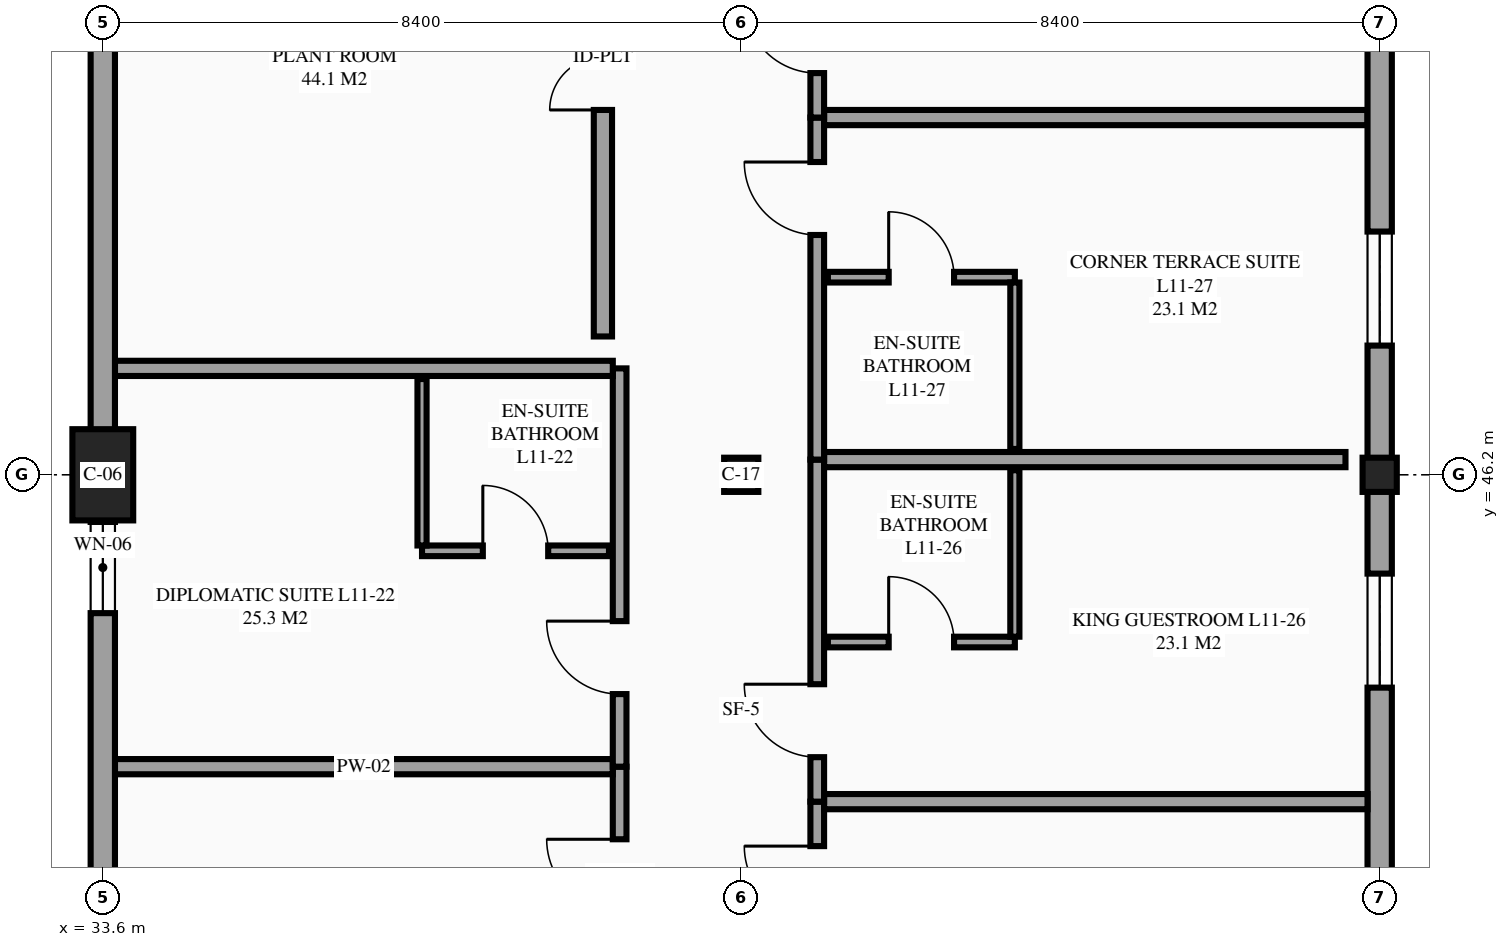
"""IFC4 building model, lengths in metres.
Left out: names, types, materials, properties, quantities, classifications, styles, units other than length and angle.
Written with IfcOpenShell. Run it as: python <this file> out.ifc"""

import sys

from ifc_helpers import new_model, si_unit, direction, frame, frame_2d, origin, origin_2d, place, context, subcontext, project, spatial, rectangle, extrude, element, fill, save


model = new_model("IFC4")
c1 = context("Model", 3, precision=1e-05, world=origin(), true_north=direction((0.0, 1.0)))
c2 = subcontext(c1, "Body", "Model", "MODEL_VIEW")
j1 = project(units=[si_unit("LENGTHUNIT", "METRE"), si_unit("PLANEANGLEUNIT", "RADIAN")], contexts=[c1])
p1 = place(None, origin())
s1 = spatial("IfcSite", under=j1, at=p1, CompositionType="ELEMENT")
p2 = place(p1, origin())
s2 = spatial("IfcBuilding", under=s1, at=p2, CompositionType="ELEMENT")
p3 = place(p2, frame((0.0, 0.0, 43.5)))
s3 = spatial("IfcBuildingStorey", under=s2, at=p3, CompositionType="ELEMENT", Elevation=43.5)
p4 = place(p3, frame((33.6, 46.2, 0.0), z_axis=(0.0, 0.0, 1.0), x_axis=(1.0, 0.0, 0.0)))
e1 = element("IfcColumn", 1, at=p4, inside=s3, PredefinedType="COLUMN", context=c2, shape_type="SweptSolid", body=[
    extrude(rectangle(XDim=0.8, YDim=1.2, at=origin_2d()), origin(), (0.0, 0.0, 1.0), 3.6),
])
for number, where, z_axis, x_axis in (
    (2, (42.0, 46.2, 0.0), (0.0, 0.0, 1.0), (1.0, 0.0, 0.0)),
    (3, (50.4, 46.2, 0.0), (0.0, 0.0, 1.0), (1.0, 0.0, 0.0)),
):
    element("IfcColumn", number, at=place(p3, frame(where, z_axis=z_axis, x_axis=x_axis)), inside=s3, PredefinedType="COLUMN", context=c2, shape_type="SweptSolid", body=[
        extrude(rectangle(XDim=0.45, YDim=0.45, at=origin_2d()), origin(), (0.0, 0.0, 1.0), 3.6),
    ])
p5 = place(p3, frame((50.4, 21.0, 0.0), z_axis=(0.0, 0.0, 1.0), x_axis=(0.0, 1.0, 0.0)))
e4 = element("IfcWall", 4, at=p5, inside=s3, PredefinedType="STANDARD", context=c2, shape_type="SweptSolid", body=[
    extrude(rectangle(XDim=25.2, YDim=0.32, at=frame_2d((12.6, 0.0))), origin(), (0.0, 0.0, 1.0), 2.51),
])
p6 = place(p5, frame((2.4, 0.0, 0.85)))
e5 = element("IfcOpeningElement", 5, at=p6, cuts=e4, PredefinedType="OPENING", context=c2, shape_type="SweptSolid", body=[
    extrude(rectangle(XDim=1.5, YDim=1.5, at=frame_2d((0.75, 0.75))), frame((0.0, 0.17, 0.0), z_axis=(0.0, -1.0, 0.0), x_axis=(1.0, 0.0, 0.0)), (0.0, 0.0, 1.0), 0.34),
])
p7 = place(p5, frame((9.15, 0.0, 0.85)))
e6 = element("IfcOpeningElement", 6, at=p7, cuts=e4, PredefinedType="OPENING", context=c2, shape_type="SweptSolid", body=[
    extrude(rectangle(XDim=1.5, YDim=1.5, at=frame_2d((0.75, 0.75))), frame((0.0, 0.17, 0.0), z_axis=(0.0, -1.0, 0.0), x_axis=(1.0, 0.0, 0.0)), (0.0, 0.0, 1.0), 0.34),
])
p8 = place(p5, frame((17.9, 0.0, 0.85)))
e7 = element("IfcOpeningElement", 7, at=p8, cuts=e4, PredefinedType="OPENING", context=c2, shape_type="SweptSolid", body=[
    extrude(rectangle(XDim=1.5, YDim=1.5, at=frame_2d((0.75, 0.75))), frame((0.0, 0.17, 0.0), z_axis=(0.0, -1.0, 0.0), x_axis=(1.0, 0.0, 0.0)), (0.0, 0.0, 1.0), 0.34),
])
p9 = place(p5, frame((22.4, 0.0, 0.85)))
e8 = element("IfcOpeningElement", 8, at=p9, cuts=e4, PredefinedType="OPENING", context=c2, shape_type="SweptSolid", body=[
    extrude(rectangle(XDim=1.5, YDim=1.5, at=frame_2d((0.75, 0.75))), frame((0.0, 0.17, 0.0), z_axis=(0.0, -1.0, 0.0), x_axis=(1.0, 0.0, 0.0)), (0.0, 0.0, 1.0), 0.34),
])
p10 = place(p3, frame((40.4, 37.12, 0.0), z_axis=(0.0, 0.0, 1.0), x_axis=(0.0, 1.0, 0.0)))
e9 = element("IfcWall", 9, at=p10, inside=s3, PredefinedType="PARTITIONING", context=c2, shape_type="SweptSolid", body=[
    extrude(rectangle(XDim=5.24, YDim=0.18, at=frame_2d((2.62, 0.0))), origin(), (0.0, 0.0, 1.0), 3.355),
])
p11 = place(p10, frame((3.325, 0.0, 0.0)))
e10 = element("IfcOpeningElement", 10, at=p11, cuts=e9, PredefinedType="OPENING", context=c2, shape_type="SweptSolid", body=[
    extrude(rectangle(XDim=0.96, YDim=2.15, at=frame_2d((0.48, 1.075))), frame((0.0, 0.1, 0.0), z_axis=(0.0, -1.0, 0.0), x_axis=(1.0, 0.0, 0.0)), (0.0, 0.0, 1.0), 0.2),
])
p12 = place(p3, frame((33.76, 42.36, 0.0), z_axis=(0.0, 0.0, 1.0), x_axis=(1.0, 0.0, 0.0)))
e11 = element("IfcWall", 11, at=p12, inside=s3, PredefinedType="PARTITIONING", context=c2, shape_type="SweptSolid", body=[
    extrude(rectangle(XDim=6.55, YDim=0.2, at=frame_2d((3.275, 0.0))), origin(), (0.0, 0.0, 1.0), 3.355),
])
p13 = place(p3, frame((40.4, 42.36, 0.0), z_axis=(0.0, 0.0, 1.0), x_axis=(0.0, 1.0, 0.0)))
e12 = element("IfcWall", 12, at=p13, inside=s3, PredefinedType="PARTITIONING", context=c2, shape_type="SweptSolid", body=[
    extrude(rectangle(XDim=5.24, YDim=0.18, at=frame_2d((2.62, 0.0))), origin(), (0.0, 0.0, 1.0), 3.355),
])
p14 = place(p13, frame((0.955, 0.0, 0.0)))
e13 = element("IfcOpeningElement", 13, at=p14, cuts=e12, PredefinedType="OPENING", context=c2, shape_type="SweptSolid", body=[
    extrude(rectangle(XDim=0.96, YDim=2.15, at=frame_2d((0.48, 1.075))), frame((0.0, 0.1, 0.0), z_axis=(0.0, -1.0, 0.0), x_axis=(1.0, 0.0, 0.0)), (0.0, 0.0, 1.0), 0.2),
])
p15 = place(p3, frame((33.76, 47.6, 0.0), z_axis=(0.0, 0.0, 1.0), x_axis=(1.0, 0.0, 0.0)))
e14 = element("IfcWall", 14, at=p15, inside=s3, PredefinedType="PARTITIONING", context=c2, shape_type="SweptSolid", body=[
    extrude(rectangle(XDim=6.55, YDim=0.2, at=frame_2d((3.275, 0.0))), origin(), (0.0, 0.0, 1.0), 3.355),
])
p16 = place(p3, frame((37.8, 45.2, 0.0), z_axis=(0.0, 0.0, 1.0), x_axis=(1.0, 0.0, 0.0)))
e15 = element("IfcWall", 15, at=p16, inside=s3, PredefinedType="PARTITIONING", context=c2, shape_type="SweptSolid", body=[
    extrude(rectangle(XDim=2.46, YDim=0.14, at=frame_2d((1.23, 0.0))), origin(), (0.0, 0.0, 1.0), 3.355),
])
p17 = place(p16, frame((0.8, 0.0, 0.0)))
e16 = element("IfcOpeningElement", 16, at=p17, cuts=e15, PredefinedType="OPENING", context=c2, shape_type="SweptSolid", body=[
    extrude(rectangle(XDim=0.86, YDim=2.1, at=frame_2d((0.43, 1.05))), frame((0.0, 0.08, 0.0), z_axis=(0.0, -1.0, 0.0), x_axis=(1.0, 0.0, 0.0)), (0.0, 0.0, 1.0), 0.16),
])
p18 = place(p3, frame((37.8, 45.27, 0.0), z_axis=(0.0, 0.0, 1.0), x_axis=(0.0, 1.0, 0.0)))
e17 = element("IfcWall", 17, at=p18, inside=s3, PredefinedType="PARTITIONING", context=c2, shape_type="SweptSolid", body=[
    extrude(rectangle(XDim=2.19, YDim=0.12, at=frame_2d((1.095, 0.0))), origin(), (0.0, 0.0, 1.0), 3.355),
])
p19 = place(p3, frame((43.0, 37.4, 0.0), z_axis=(0.0, 0.0, 1.0), x_axis=(0.0, 1.0, 0.0)))
e18 = element("IfcWall", 18, at=p19, inside=s3, PredefinedType="PARTITIONING", context=c2, shape_type="SweptSolid", body=[
    extrude(rectangle(XDim=4.5, YDim=0.18, at=frame_2d((2.25, 0.0))), origin(), (0.0, 0.0, 1.0), 3.355),
])
p20 = place(p19, frame((2.955, 0.0, 0.0)))
e19 = element("IfcOpeningElement", 19, at=p20, cuts=e18, PredefinedType="OPENING", context=c2, shape_type="SweptSolid", body=[
    extrude(rectangle(XDim=0.96, YDim=2.15, at=frame_2d((0.48, 1.075))), frame((0.0, 0.1, 0.0), z_axis=(0.0, -1.0, 0.0), x_axis=(1.0, 0.0, 0.0)), (0.0, 0.0, 1.0), 0.2),
])
p21 = place(p3, frame((43.09, 41.9, 0.0), z_axis=(0.0, 0.0, 1.0), x_axis=(1.0, 0.0, 0.0)))
e20 = element("IfcWall", 20, at=p21, inside=s3, PredefinedType="PARTITIONING", context=c2, shape_type="SweptSolid", body=[
    extrude(rectangle(XDim=7.15, YDim=0.2, at=frame_2d((3.575, 0.0))), origin(), (0.0, 0.0, 1.0), 2.81),
])
p22 = place(p3, frame((43.0, 41.9, 0.0), z_axis=(0.0, 0.0, 1.0), x_axis=(0.0, 1.0, 0.0)))
e21 = element("IfcWall", 21, at=p22, inside=s3, PredefinedType="PARTITIONING", context=c2, shape_type="SweptSolid", body=[
    extrude(rectangle(XDim=4.5, YDim=0.18, at=frame_2d((2.25, 0.0))), origin(), (0.0, 0.0, 1.0), 3.355),
])
p23 = place(p22, frame((0.585, 0.0, 0.0)))
e22 = element("IfcOpeningElement", 22, at=p23, cuts=e21, PredefinedType="OPENING", context=c2, shape_type="SweptSolid", body=[
    extrude(rectangle(XDim=0.96, YDim=2.15, at=frame_2d((0.48, 1.075))), frame((0.0, 0.1, 0.0), z_axis=(0.0, -1.0, 0.0), x_axis=(1.0, 0.0, 0.0)), (0.0, 0.0, 1.0), 0.2),
])
p24 = place(p3, frame((43.09, 46.4, 0.0), z_axis=(0.0, 0.0, 1.0), x_axis=(1.0, 0.0, 0.0)))
e23 = element("IfcWall", 23, at=p24, inside=s3, PredefinedType="PARTITIONING", context=c2, shape_type="SweptSolid", body=[
    extrude(rectangle(XDim=6.86, YDim=0.2, at=frame_2d((3.43, 0.0))), origin(), (0.0, 0.0, 1.0), 2.66),
])
p25 = place(p3, frame((43.14, 44.0, 0.0), z_axis=(0.0, 0.0, 1.0), x_axis=(1.0, 0.0, 0.0)))
e24 = element("IfcWall", 24, at=p25, inside=s3, PredefinedType="PARTITIONING", context=c2, shape_type="SweptSolid", body=[
    extrude(rectangle(XDim=2.46, YDim=0.14, at=frame_2d((1.23, 0.0))), origin(), (0.0, 0.0, 1.0), 3.355),
])
p26 = place(p25, frame((0.8, 0.0, 0.0)))
e25 = element("IfcOpeningElement", 25, at=p26, cuts=e24, PredefinedType="OPENING", context=c2, shape_type="SweptSolid", body=[
    extrude(rectangle(XDim=0.86, YDim=2.1, at=frame_2d((0.43, 1.05))), frame((0.0, 0.08, 0.0), z_axis=(0.0, -1.0, 0.0), x_axis=(1.0, 0.0, 0.0)), (0.0, 0.0, 1.0), 0.16),
])
p27 = place(p3, frame((45.6, 44.07, 0.0), z_axis=(0.0, 0.0, 1.0), x_axis=(0.0, 1.0, 0.0)))
e26 = element("IfcWall", 26, at=p27, inside=s3, PredefinedType="PARTITIONING", context=c2, shape_type="SweptSolid", body=[
    extrude(rectangle(XDim=2.19, YDim=0.12, at=frame_2d((1.095, 0.0))), origin(), (0.0, 0.0, 1.0), 3.355),
])
p28 = place(p3, frame((43.0, 46.4, 0.0), z_axis=(0.0, 0.0, 1.0), x_axis=(0.0, 1.0, 0.0)))
e27 = element("IfcWall", 27, at=p28, inside=s3, PredefinedType="PARTITIONING", context=c2, shape_type="SweptSolid", body=[
    extrude(rectangle(XDim=4.5, YDim=0.18, at=frame_2d((2.25, 0.0))), origin(), (0.0, 0.0, 1.0), 3.355),
])
p29 = place(p28, frame((2.955, 0.0, 0.0)))
e28 = element("IfcOpeningElement", 28, at=p29, cuts=e27, PredefinedType="OPENING", context=c2, shape_type="SweptSolid", body=[
    extrude(rectangle(XDim=0.96, YDim=2.15, at=frame_2d((0.48, 1.075))), frame((0.0, 0.1, 0.0), z_axis=(0.0, -1.0, 0.0), x_axis=(1.0, 0.0, 0.0)), (0.0, 0.0, 1.0), 0.2),
])
p30 = place(p3, frame((43.09, 50.9, 0.0), z_axis=(0.0, 0.0, 1.0), x_axis=(1.0, 0.0, 0.0)))
e29 = element("IfcWall", 29, at=p30, inside=s3, PredefinedType="PARTITIONING", context=c2, shape_type="SweptSolid", body=[
    extrude(rectangle(XDim=7.15, YDim=0.2, at=frame_2d((3.575, 0.0))), origin(), (0.0, 0.0, 1.0), 3.355),
])
p31 = place(p3, frame((43.14, 48.8, 0.0), z_axis=(0.0, 0.0, 1.0), x_axis=(1.0, 0.0, 0.0)))
e30 = element("IfcWall", 30, at=p31, inside=s3, PredefinedType="PARTITIONING", context=c2, shape_type="SweptSolid", body=[
    extrude(rectangle(XDim=2.46, YDim=0.14, at=frame_2d((1.23, 0.0))), origin(), (0.0, 0.0, 1.0), 3.355),
])
p32 = place(p31, frame((0.8, 0.0, 0.0)))
e31 = element("IfcOpeningElement", 31, at=p32, cuts=e30, PredefinedType="OPENING", context=c2, shape_type="SweptSolid", body=[
    extrude(rectangle(XDim=0.86, YDim=2.1, at=frame_2d((0.43, 1.05))), frame((0.0, 0.08, 0.0), z_axis=(0.0, -1.0, 0.0), x_axis=(1.0, 0.0, 0.0)), (0.0, 0.0, 1.0), 0.16),
])
p33 = place(p3, frame((45.6, 46.54, 0.0), z_axis=(0.0, 0.0, 1.0), x_axis=(0.0, 1.0, 0.0)))
e32 = element("IfcWall", 32, at=p33, inside=s3, PredefinedType="PARTITIONING", context=c2, shape_type="SweptSolid", body=[
    extrude(rectangle(XDim=2.19, YDim=0.12, at=frame_2d((1.095, 0.0))), origin(), (0.0, 0.0, 1.0), 3.355),
])
p34 = place(p3, frame((43.0, 50.9, 0.0), z_axis=(0.0, 0.0, 1.0), x_axis=(0.0, 1.0, 0.0)))
e33 = element("IfcWall", 33, at=p34, inside=s3, PredefinedType="PARTITIONING", context=c2, shape_type="SweptSolid", body=[
    extrude(rectangle(XDim=4.5, YDim=0.18, at=frame_2d((2.25, 0.0))), origin(), (0.0, 0.0, 1.0), 3.355),
])
p35 = place(p34, frame((0.585, 0.0, 0.0)))
e34 = element("IfcOpeningElement", 34, at=p35, cuts=e33, PredefinedType="OPENING", context=c2, shape_type="SweptSolid", body=[
    extrude(rectangle(XDim=0.96, YDim=2.15, at=frame_2d((0.48, 1.075))), frame((0.0, 0.1, 0.0), z_axis=(0.0, -1.0, 0.0), x_axis=(1.0, 0.0, 0.0)), (0.0, 0.0, 1.0), 0.2),
])
p36 = place(p3, frame((40.18, 48.02, 0.0), z_axis=(0.0, 0.0, 1.0), x_axis=(0.0, 1.0, 0.0)))
e35 = element("IfcWall", 35, at=p36, inside=s3, PredefinedType="PARTITIONING", context=c2, shape_type="SweptSolid", body=[
    extrude(rectangle(XDim=7.36, YDim=0.24, at=frame_2d((3.68, 0.0))), origin(), (0.0, 0.0, 1.0), 3.355),
])
p37 = place(p36, frame((2.98, 0.0, 0.0)))
e36 = element("IfcOpeningElement", 36, at=p37, cuts=e35, PredefinedType="OPENING", context=c2, shape_type="SweptSolid", body=[
    extrude(rectangle(XDim=1.4, YDim=2.2, at=frame_2d((0.7, 1.1))), frame((0.0, 0.13, 0.0), z_axis=(0.0, -1.0, 0.0), x_axis=(1.0, 0.0, 0.0)), (0.0, 0.0, 1.0), 0.26),
])
p38 = place(p3, frame((50.4, 46.2, 0.0), z_axis=(0.0, 0.0, 1.0), x_axis=(0.0, 1.0, 0.0)))
e37 = element("IfcWall", 37, at=p38, inside=s3, PredefinedType="STANDARD", context=c2, shape_type="SweptSolid", body=[
    extrude(rectangle(XDim=8.4, YDim=0.32, at=frame_2d((4.2, 0.0))), origin(), (0.0, 0.0, 1.0), 3.05),
])
p39 = place(p38, frame((1.7, 0.0, 0.85)))
e38 = element("IfcOpeningElement", 38, at=p39, cuts=e37, PredefinedType="OPENING", context=c2, shape_type="SweptSolid", body=[
    extrude(rectangle(XDim=1.5, YDim=1.5, at=frame_2d((0.75, 0.75))), frame((0.0, 0.17, 0.0), z_axis=(0.0, -1.0, 0.0), x_axis=(1.0, 0.0, 0.0)), (0.0, 0.0, 1.0), 0.34),
])
p40 = place(p38, frame((6.2, 0.0, 0.85)))
e39 = element("IfcOpeningElement", 39, at=p40, cuts=e37, PredefinedType="OPENING", context=c2, shape_type="SweptSolid", body=[
    extrude(rectangle(XDim=1.5, YDim=1.5, at=frame_2d((0.75, 0.75))), frame((0.0, 0.17, 0.0), z_axis=(0.0, -1.0, 0.0), x_axis=(1.0, 0.0, 0.0)), (0.0, 0.0, 1.0), 0.34),
])
p41 = place(p3, frame((33.6, 54.6, 0.0), z_axis=(0.0, 0.0, 1.0), x_axis=(0.0, -1.0, 0.0)))
e40 = element("IfcWall", 40, at=p41, inside=s3, PredefinedType="STANDARD", context=c2, shape_type="SweptSolid", body=[
    extrude(rectangle(XDim=16.8, YDim=0.32, at=frame_2d((8.4, 0.0))), origin(), (0.0, 0.0, 1.0), 2.46),
])
p42 = place(p41, frame((14.11, 0.0, 0.85)))
e41 = element("IfcOpeningElement", 41, at=p42, cuts=e40, PredefinedType="OPENING", context=c2, shape_type="SweptSolid", body=[
    extrude(rectangle(XDim=1.5, YDim=1.5, at=frame_2d((0.75, 0.75))), frame((0.0, 0.17, 0.0), z_axis=(0.0, -1.0, 0.0), x_axis=(1.0, 0.0, 0.0)), (0.0, 0.0, 1.0), 0.34),
])
p43 = place(p41, frame((9.02, 0.0, 0.85)))
e42 = element("IfcOpeningElement", 42, at=p43, cuts=e40, PredefinedType="OPENING", context=c2, shape_type="SweptSolid", body=[
    extrude(rectangle(XDim=1.2, YDim=1.5, at=frame_2d((0.6, 0.75))), frame((0.0, 0.17, 0.0), z_axis=(0.0, -1.0, 0.0), x_axis=(1.0, 0.0, 0.0)), (0.0, 0.0, 1.0), 0.34),
])
p44 = place(p43, origin())
e43 = element("IfcWindow", 43, at=p44, inside=s3, PartitioningType="SINGLE_PANEL", PredefinedType="WINDOW", context=c2, shape_type="SweptSolid", body=[
    extrude(rectangle(XDim=1.2, YDim=1.5, at=frame_2d((0.6, 0.75))), frame((0.0, 0.03, 0.0), z_axis=(0.0, -1.0, 0.0), x_axis=(1.0, 0.0, 0.0)), (0.0, 0.0, 1.0), 0.06),
])
fill(e42, e43)
p45 = place(p9, origin())
e44 = element("IfcWindow", 44, at=p45, inside=s3, PartitioningType="SINGLE_PANEL", PredefinedType="WINDOW", context=c2, shape_type="SweptSolid", body=[
    extrude(rectangle(XDim=1.5, YDim=1.5, at=frame_2d((0.75, 0.75))), frame((0.0, 0.03, 0.0), z_axis=(0.0, -1.0, 0.0), x_axis=(1.0, 0.0, 0.0)), (0.0, 0.0, 1.0), 0.06),
])
fill(e8, e44)
p46 = place(p39, origin())
e45 = element("IfcWindow", 45, at=p46, inside=s3, PartitioningType="SINGLE_PANEL", PredefinedType="WINDOW", context=c2, shape_type="SweptSolid", body=[
    extrude(rectangle(XDim=1.5, YDim=1.5, at=frame_2d((0.75, 0.75))), frame((0.0, 0.03, 0.0), z_axis=(0.0, -1.0, 0.0), x_axis=(1.0, 0.0, 0.0)), (0.0, 0.0, 1.0), 0.06),
])
fill(e38, e45)
p47 = place(p11, origin())
e46 = element("IfcDoor", 46, at=p47, inside=s3, OperationType="SINGLE_SWING_RIGHT", PredefinedType="DOOR", context=c2, shape_type="SweptSolid", body=[
    extrude(rectangle(XDim=0.96, YDim=2.15, at=frame_2d((0.48, 1.075))), frame((0.0, 0.025, 0.0), z_axis=(0.0, -1.0, 0.0), x_axis=(1.0, 0.0, 0.0)), (0.0, 0.0, 1.0), 0.05),
])
fill(e10, e46)
p48 = place(p14, origin())
e47 = element("IfcDoor", 47, at=p48, inside=s3, OperationType="SINGLE_SWING_RIGHT", PredefinedType="DOOR", context=c2, shape_type="SweptSolid", body=[
    extrude(rectangle(XDim=0.96, YDim=2.15, at=frame_2d((0.48, 1.075))), frame((0.0, 0.025, 0.0), z_axis=(0.0, -1.0, 0.0), x_axis=(1.0, 0.0, 0.0)), (0.0, 0.0, 1.0), 0.05),
])
fill(e13, e47)
p49 = place(p17, origin())
e48 = element("IfcDoor", 48, at=p49, inside=s3, OperationType="SINGLE_SWING_LEFT", PredefinedType="DOOR", context=c2, shape_type="SweptSolid", body=[
    extrude(rectangle(XDim=0.86, YDim=2.1, at=frame_2d((0.43, 1.05))), frame((0.0, 0.025, 0.0), z_axis=(0.0, -1.0, 0.0), x_axis=(1.0, 0.0, 0.0)), (0.0, 0.0, 1.0), 0.05),
])
fill(e16, e48)
p50 = place(p20, origin())
e49 = element("IfcDoor", 49, at=p50, inside=s3, OperationType="SINGLE_SWING_RIGHT", PredefinedType="DOOR", context=c2, shape_type="SweptSolid", body=[
    extrude(rectangle(XDim=0.96, YDim=2.15, at=frame_2d((0.48, 1.075))), frame((0.0, 0.025, 0.0), z_axis=(0.0, -1.0, 0.0), x_axis=(1.0, 0.0, 0.0)), (0.0, 0.0, 1.0), 0.05),
])
fill(e19, e49)
p51 = place(p23, origin())
e50 = element("IfcDoor", 50, at=p51, inside=s3, OperationType="SINGLE_SWING_RIGHT", PredefinedType="DOOR", context=c2, shape_type="SweptSolid", body=[
    extrude(rectangle(XDim=0.96, YDim=2.15, at=frame_2d((0.48, 1.075))), frame((0.0, 0.025, 0.0), z_axis=(0.0, -1.0, 0.0), x_axis=(1.0, 0.0, 0.0)), (0.0, 0.0, 1.0), 0.05),
])
fill(e22, e50)
p52 = place(p26, origin())
e51 = element("IfcDoor", 51, at=p52, inside=s3, OperationType="SINGLE_SWING_LEFT", PredefinedType="DOOR", context=c2, shape_type="SweptSolid", body=[
    extrude(rectangle(XDim=0.86, YDim=2.1, at=frame_2d((0.43, 1.05))), frame((0.0, 0.025, 0.0), z_axis=(0.0, -1.0, 0.0), x_axis=(1.0, 0.0, 0.0)), (0.0, 0.0, 1.0), 0.05),
])
fill(e25, e51)
p53 = place(p29, origin())
e52 = element("IfcDoor", 52, at=p53, inside=s3, OperationType="SINGLE_SWING_RIGHT", PredefinedType="DOOR", context=c2, shape_type="SweptSolid", body=[
    extrude(rectangle(XDim=0.96, YDim=2.15, at=frame_2d((0.48, 1.075))), frame((0.0, 0.025, 0.0), z_axis=(0.0, -1.0, 0.0), x_axis=(1.0, 0.0, 0.0)), (0.0, 0.0, 1.0), 0.05),
])
fill(e28, e52)
p54 = place(p32, origin())
e53 = element("IfcDoor", 53, at=p54, inside=s3, OperationType="SINGLE_SWING_LEFT", PredefinedType="DOOR", context=c2, shape_type="SweptSolid", body=[
    extrude(rectangle(XDim=0.86, YDim=2.1, at=frame_2d((0.43, 1.05))), frame((0.0, 0.025, 0.0), z_axis=(0.0, -1.0, 0.0), x_axis=(1.0, 0.0, 0.0)), (0.0, 0.0, 1.0), 0.05),
])
fill(e31, e53)
p55 = place(p35, origin())
e54 = element("IfcDoor", 54, at=p55, inside=s3, OperationType="SINGLE_SWING_RIGHT", PredefinedType="DOOR", context=c2, shape_type="SweptSolid", body=[
    extrude(rectangle(XDim=0.96, YDim=2.15, at=frame_2d((0.48, 1.075))), frame((0.0, 0.025, 0.0), z_axis=(0.0, -1.0, 0.0), x_axis=(1.0, 0.0, 0.0)), (0.0, 0.0, 1.0), 0.05),
])
fill(e34, e54)
p56 = place(p37, origin())
e55 = element("IfcDoor", 55, at=p56, inside=s3, OperationType="DOUBLE_DOOR_SINGLE_SWING", PredefinedType="DOOR", context=c2, shape_type="SweptSolid", body=[
    extrude(rectangle(XDim=1.4, YDim=2.2, at=frame_2d((0.7, 1.1))), frame((0.0, 0.025, 0.0), z_axis=(0.0, -1.0, 0.0), x_axis=(1.0, 0.0, 0.0)), (0.0, 0.0, 1.0), 0.05),
])
fill(e36, e55)
save(model, sys.argv[1])
